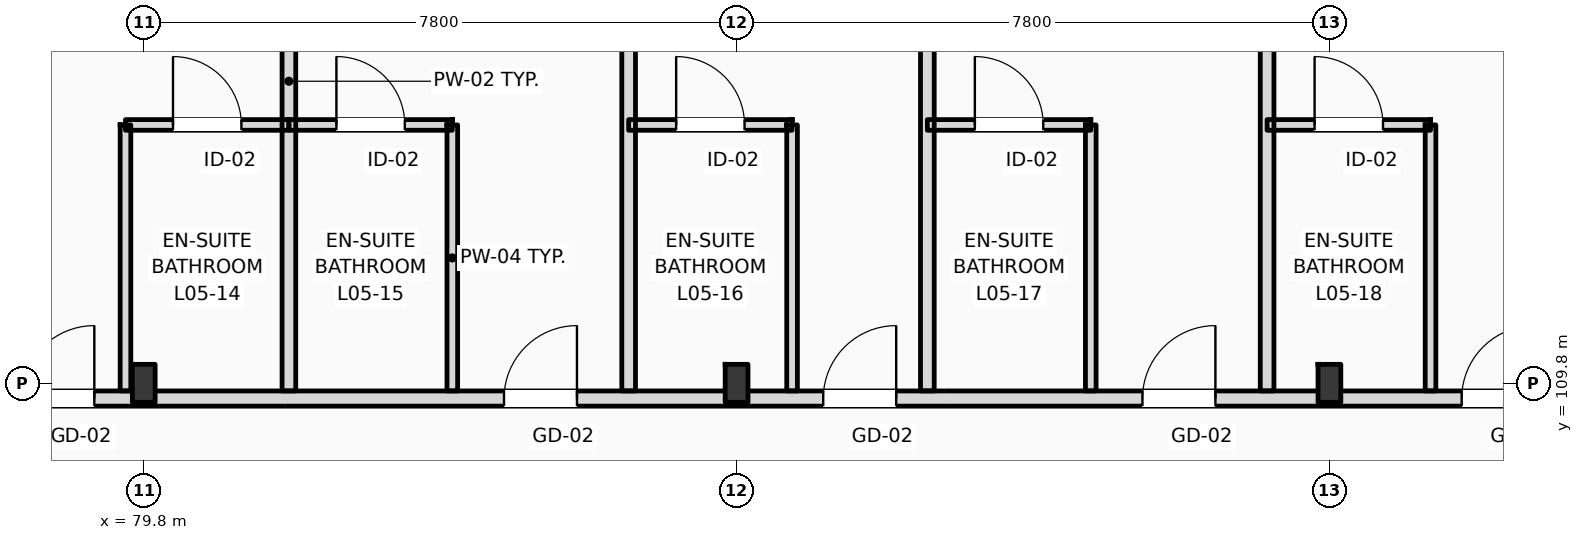
"""IFC4 building model, lengths in metres.
Left out: names, types, materials, properties, quantities, classifications, styles, units other than length and angle.
Written with IfcOpenShell. Run it as: python <this file> out.ifc"""

import sys

from ifc_helpers import new_model, si_unit, direction, frame, frame_2d, origin, origin_2d, place, context, subcontext, project, spatial, rectangle, i_section, extrude, element, fill, save


model = new_model("IFC4")
c1 = context("Model", 3, precision=1e-05, world=origin(), true_north=direction((0.0, 1.0)))
c2 = subcontext(c1, "Body", "Model", "MODEL_VIEW")
j1 = project(units=[si_unit("LENGTHUNIT", "METRE"), si_unit("PLANEANGLEUNIT", "RADIAN")], contexts=[c1])
p1 = place(None, origin())
s1 = spatial("IfcSite", under=j1, at=p1, CompositionType="ELEMENT")
p2 = place(p1, origin())
s2 = spatial("IfcBuilding", under=s1, at=p2, CompositionType="ELEMENT")
p3 = place(p2, frame((0.0, 0.0, 24.6)))
s3 = spatial("IfcBuildingStorey", under=s2, at=p3, CompositionType="ELEMENT", Elevation=24.6)
for number, where, z_axis, x_axis in (
    (1, (79.8, 109.8, 0.0), (0.0, 0.0, 1.0), (1.0, 0.0, 0.0)),
    (2, (87.6, 109.8, 0.0), (0.0, 0.0, 1.0), (1.0, 0.0, 0.0)),
    (3, (95.4, 109.8, 0.0), (0.0, 0.0, 1.0), (1.0, 0.0, 0.0)),
):
    element("IfcColumn", number, at=place(p3, frame(where, z_axis=z_axis, x_axis=x_axis)), inside=s3, PredefinedType="COLUMN", context=c2, shape_type="SweptSolid", body=[
        extrude(i_section(OverallWidth=0.3, OverallDepth=0.5, WebThickness=0.014, FlangeThickness=0.028, FilletRadius=0.027, at=origin_2d()), origin(), (0.0, 0.0, 1.0), 3.6),
    ])
p4 = place(p3, frame((10.65, 109.6, 0.0), z_axis=(0.0, 0.0, 1.0), x_axis=(1.0, 0.0, 0.0)))
e4 = element("IfcWall", 4, at=p4, inside=s3, PredefinedType="PARTITIONING", context=c2, shape_type="SweptSolid", body=[
    extrude(rectangle(XDim=109.21, YDim=0.2, at=frame_2d((54.605, 0.0))), origin(), (0.0, 0.0, 1.0), 2.78),
])
p5 = place(p4, frame((12.705, 0.0, 0.0)))
e5 = element("IfcOpeningElement", 5, at=p5, cuts=e4, PredefinedType="OPENING", context=c2, shape_type="SweptSolid", body=[
    extrude(rectangle(XDim=1.02, YDim=2.2, at=frame_2d((0.51, 1.1))), frame((0.0, 0.11, 0.0), z_axis=(0.0, -1.0, 0.0), x_axis=(1.0, 0.0, 0.0)), (0.0, 0.0, 1.0), 0.22),
])
p6 = place(p4, frame((19.26, 0.0, 0.0)))
e6 = element("IfcOpeningElement", 6, at=p6, cuts=e4, PredefinedType="OPENING", context=c2, shape_type="SweptSolid", body=[
    extrude(rectangle(XDim=1.02, YDim=2.2, at=frame_2d((0.51, 1.1))), frame((0.0, 0.11, 0.0), z_axis=(0.0, -1.0, 0.0), x_axis=(1.0, 0.0, 0.0)), (0.0, 0.0, 1.0), 0.22),
])
p7 = place(p4, frame((23.71, 0.0, 0.0)))
e7 = element("IfcOpeningElement", 7, at=p7, cuts=e4, PredefinedType="OPENING", context=c2, shape_type="SweptSolid", body=[
    extrude(rectangle(XDim=1.02, YDim=2.2, at=frame_2d((0.51, 1.1))), frame((0.0, 0.11, 0.0), z_axis=(0.0, -1.0, 0.0), x_axis=(1.0, 0.0, 0.0)), (0.0, 0.0, 1.0), 0.22),
])
p8 = place(p4, frame((27.66, 0.0, 0.0)))
e8 = element("IfcOpeningElement", 8, at=p8, cuts=e4, PredefinedType="OPENING", context=c2, shape_type="SweptSolid", body=[
    extrude(rectangle(XDim=1.02, YDim=2.2, at=frame_2d((0.51, 1.1))), frame((0.0, 0.11, 0.0), z_axis=(0.0, -1.0, 0.0), x_axis=(1.0, 0.0, 0.0)), (0.0, 0.0, 1.0), 0.22),
])
p9 = place(p4, frame((31.89, 0.0, 0.0)))
e9 = element("IfcOpeningElement", 9, at=p9, cuts=e4, PredefinedType="OPENING", context=c2, shape_type="SweptSolid", body=[
    extrude(rectangle(XDim=0.96, YDim=2.2, at=frame_2d((0.48, 1.1))), frame((0.0, 0.11, 0.0), z_axis=(0.0, -1.0, 0.0), x_axis=(1.0, 0.0, 0.0)), (0.0, 0.0, 1.0), 0.22),
])
p10 = place(p4, frame((33.94, 0.0, 0.0)))
e10 = element("IfcOpeningElement", 10, at=p10, cuts=e4, PredefinedType="OPENING", context=c2, shape_type="SweptSolid", body=[
    extrude(rectangle(XDim=0.96, YDim=2.2, at=frame_2d((0.48, 1.1))), frame((0.0, 0.11, 0.0), z_axis=(0.0, -1.0, 0.0), x_axis=(1.0, 0.0, 0.0)), (0.0, 0.0, 1.0), 0.22),
])
p11 = place(p4, frame((40.29, 0.0, 0.0)))
e11 = element("IfcOpeningElement", 11, at=p11, cuts=e4, PredefinedType="OPENING", context=c2, shape_type="SweptSolid", body=[
    extrude(rectangle(XDim=0.96, YDim=2.2, at=frame_2d((0.48, 1.1))), frame((0.0, 0.11, 0.0), z_axis=(0.0, -1.0, 0.0), x_axis=(1.0, 0.0, 0.0)), (0.0, 0.0, 1.0), 0.22),
])
p12 = place(p4, frame((42.34, 0.0, 0.0)))
e12 = element("IfcOpeningElement", 12, at=p12, cuts=e4, PredefinedType="OPENING", context=c2, shape_type="SweptSolid", body=[
    extrude(rectangle(XDim=0.96, YDim=2.2, at=frame_2d((0.48, 1.1))), frame((0.0, 0.11, 0.0), z_axis=(0.0, -1.0, 0.0), x_axis=(1.0, 0.0, 0.0)), (0.0, 0.0, 1.0), 0.22),
])
p13 = place(p4, frame((48.69, 0.0, 0.0)))
e13 = element("IfcOpeningElement", 13, at=p13, cuts=e4, PredefinedType="OPENING", context=c2, shape_type="SweptSolid", body=[
    extrude(rectangle(XDim=0.96, YDim=2.2, at=frame_2d((0.48, 1.1))), frame((0.0, 0.11, 0.0), z_axis=(0.0, -1.0, 0.0), x_axis=(1.0, 0.0, 0.0)), (0.0, 0.0, 1.0), 0.22),
])
p14 = place(p4, frame((50.74, 0.0, 0.0)))
e14 = element("IfcOpeningElement", 14, at=p14, cuts=e4, PredefinedType="OPENING", context=c2, shape_type="SweptSolid", body=[
    extrude(rectangle(XDim=0.96, YDim=2.2, at=frame_2d((0.48, 1.1))), frame((0.0, 0.11, 0.0), z_axis=(0.0, -1.0, 0.0), x_axis=(1.0, 0.0, 0.0)), (0.0, 0.0, 1.0), 0.22),
])
p15 = place(p4, frame((57.09, 0.0, 0.0)))
e15 = element("IfcOpeningElement", 15, at=p15, cuts=e4, PredefinedType="OPENING", context=c2, shape_type="SweptSolid", body=[
    extrude(rectangle(XDim=0.96, YDim=2.2, at=frame_2d((0.48, 1.1))), frame((0.0, 0.11, 0.0), z_axis=(0.0, -1.0, 0.0), x_axis=(1.0, 0.0, 0.0)), (0.0, 0.0, 1.0), 0.22),
])
p16 = place(p4, frame((59.14, 0.0, 0.0)))
e16 = element("IfcOpeningElement", 16, at=p16, cuts=e4, PredefinedType="OPENING", context=c2, shape_type="SweptSolid", body=[
    extrude(rectangle(XDim=0.96, YDim=2.2, at=frame_2d((0.48, 1.1))), frame((0.0, 0.11, 0.0), z_axis=(0.0, -1.0, 0.0), x_axis=(1.0, 0.0, 0.0)), (0.0, 0.0, 1.0), 0.22),
])
p17 = place(p4, frame((65.49, 0.0, 0.0)))
e17 = element("IfcOpeningElement", 17, at=p17, cuts=e4, PredefinedType="OPENING", context=c2, shape_type="SweptSolid", body=[
    extrude(rectangle(XDim=0.96, YDim=2.2, at=frame_2d((0.48, 1.1))), frame((0.0, 0.11, 0.0), z_axis=(0.0, -1.0, 0.0), x_axis=(1.0, 0.0, 0.0)), (0.0, 0.0, 1.0), 0.22),
])
p18 = place(p4, frame((67.54, 0.0, 0.0)))
e18 = element("IfcOpeningElement", 18, at=p18, cuts=e4, PredefinedType="OPENING", context=c2, shape_type="SweptSolid", body=[
    extrude(rectangle(XDim=0.96, YDim=2.2, at=frame_2d((0.48, 1.1))), frame((0.0, 0.11, 0.0), z_axis=(0.0, -1.0, 0.0), x_axis=(1.0, 0.0, 0.0)), (0.0, 0.0, 1.0), 0.22),
])
p19 = place(p4, frame((73.89, 0.0, 0.0)))
e19 = element("IfcOpeningElement", 19, at=p19, cuts=e4, PredefinedType="OPENING", context=c2, shape_type="SweptSolid", body=[
    extrude(rectangle(XDim=0.96, YDim=2.2, at=frame_2d((0.48, 1.1))), frame((0.0, 0.11, 0.0), z_axis=(0.0, -1.0, 0.0), x_axis=(1.0, 0.0, 0.0)), (0.0, 0.0, 1.0), 0.22),
])
p20 = place(p4, frame((78.09, 0.0, 0.0)))
e20 = element("IfcOpeningElement", 20, at=p20, cuts=e4, PredefinedType="OPENING", context=c2, shape_type="SweptSolid", body=[
    extrude(rectangle(XDim=0.96, YDim=2.2, at=frame_2d((0.48, 1.1))), frame((0.0, 0.11, 0.0), z_axis=(0.0, -1.0, 0.0), x_axis=(1.0, 0.0, 0.0)), (0.0, 0.0, 1.0), 0.22),
])
p21 = place(p4, frame((82.29, 0.0, 0.0)))
e21 = element("IfcOpeningElement", 21, at=p21, cuts=e4, PredefinedType="OPENING", context=c2, shape_type="SweptSolid", body=[
    extrude(rectangle(XDim=0.96, YDim=2.2, at=frame_2d((0.48, 1.1))), frame((0.0, 0.11, 0.0), z_axis=(0.0, -1.0, 0.0), x_axis=(1.0, 0.0, 0.0)), (0.0, 0.0, 1.0), 0.22),
])
p22 = place(p4, frame((86.49, 0.0, 0.0)))
e22 = element("IfcOpeningElement", 22, at=p22, cuts=e4, PredefinedType="OPENING", context=c2, shape_type="SweptSolid", body=[
    extrude(rectangle(XDim=0.96, YDim=2.2, at=frame_2d((0.48, 1.1))), frame((0.0, 0.11, 0.0), z_axis=(0.0, -1.0, 0.0), x_axis=(1.0, 0.0, 0.0)), (0.0, 0.0, 1.0), 0.22),
])
p23 = place(p4, frame((88.54, 0.0, 0.0)))
e23 = element("IfcOpeningElement", 23, at=p23, cuts=e4, PredefinedType="OPENING", context=c2, shape_type="SweptSolid", body=[
    extrude(rectangle(XDim=0.96, YDim=2.2, at=frame_2d((0.48, 1.1))), frame((0.0, 0.11, 0.0), z_axis=(0.0, -1.0, 0.0), x_axis=(1.0, 0.0, 0.0)), (0.0, 0.0, 1.0), 0.22),
])
p24 = place(p4, frame((94.89, 0.0, 0.0)))
e24 = element("IfcOpeningElement", 24, at=p24, cuts=e4, PredefinedType="OPENING", context=c2, shape_type="SweptSolid", body=[
    extrude(rectangle(XDim=0.96, YDim=2.2, at=frame_2d((0.48, 1.1))), frame((0.0, 0.11, 0.0), z_axis=(0.0, -1.0, 0.0), x_axis=(1.0, 0.0, 0.0)), (0.0, 0.0, 1.0), 0.22),
])
p25 = place(p4, frame((96.94, 0.0, 0.0)))
e25 = element("IfcOpeningElement", 25, at=p25, cuts=e4, PredefinedType="OPENING", context=c2, shape_type="SweptSolid", body=[
    extrude(rectangle(XDim=0.96, YDim=2.2, at=frame_2d((0.48, 1.1))), frame((0.0, 0.11, 0.0), z_axis=(0.0, -1.0, 0.0), x_axis=(1.0, 0.0, 0.0)), (0.0, 0.0, 1.0), 0.22),
])
p26 = place(p4, frame((103.29, 0.0, 0.0)))
e26 = element("IfcOpeningElement", 26, at=p26, cuts=e4, PredefinedType="OPENING", context=c2, shape_type="SweptSolid", body=[
    extrude(rectangle(XDim=0.96, YDim=2.2, at=frame_2d((0.48, 1.1))), frame((0.0, 0.11, 0.0), z_axis=(0.0, -1.0, 0.0), x_axis=(1.0, 0.0, 0.0)), (0.0, 0.0, 1.0), 0.22),
])
p27 = place(p4, frame((105.25, 0.0, 0.0)))
e27 = element("IfcOpeningElement", 27, at=p27, cuts=e4, PredefinedType="OPENING", context=c2, shape_type="SweptSolid", body=[
    extrude(rectangle(XDim=0.96, YDim=2.2, at=frame_2d((0.48, 1.1))), frame((0.0, 0.11, 0.0), z_axis=(0.0, -1.0, 0.0), x_axis=(1.0, 0.0, 0.0)), (0.0, 0.0, 1.0), 0.22),
])
p28 = place(p4, frame((2.716, 0.0, 0.0)))
e28 = element("IfcOpeningElement", 28, at=p28, cuts=e4, PredefinedType="OPENING", context=c2, shape_type="SweptSolid", body=[
    extrude(rectangle(XDim=1.35, YDim=2.25, at=frame_2d((0.675, 1.125))), frame((0.0, 0.11, 0.0), z_axis=(0.0, -1.0, 0.0), x_axis=(1.0, 0.0, 0.0)), (0.0, 0.0, 1.0), 0.22),
])
p29 = place(p4, frame((6.65, 0.0, 0.0)))
e29 = element("IfcOpeningElement", 29, at=p29, cuts=e4, PredefinedType="OPENING", context=c2, shape_type="SweptSolid", body=[
    extrude(rectangle(XDim=1.35, YDim=2.25, at=frame_2d((0.675, 1.125))), frame((0.0, 0.11, 0.0), z_axis=(0.0, -1.0, 0.0), x_axis=(1.0, 0.0, 0.0)), (0.0, 0.0, 1.0), 0.22),
])
p30 = place(p4, frame((10.583, 0.0, 0.0)))
e30 = element("IfcOpeningElement", 30, at=p30, cuts=e4, PredefinedType="OPENING", context=c2, shape_type="SweptSolid", body=[
    extrude(rectangle(XDim=1.35, YDim=2.25, at=frame_2d((0.675, 1.125))), frame((0.0, 0.11, 0.0), z_axis=(0.0, -1.0, 0.0), x_axis=(1.0, 0.0, 0.0)), (0.0, 0.0, 1.0), 0.22),
])
p31 = place(p3, frame((81.71, 109.7, 0.0), z_axis=(0.0, 0.0, 1.0), x_axis=(0.0, 1.0, 0.0)))
e31 = element("IfcWall", 31, at=p31, inside=s3, PredefinedType="PARTITIONING", context=c2, shape_type="SweptSolid", body=[
    extrude(rectangle(XDim=8.15, YDim=0.18, at=frame_2d((4.075, 0.0))), origin(), (0.0, 0.0, 1.0), 3.34),
])
p32 = place(p3, frame((79.56, 109.7, 0.0), z_axis=(0.0, 0.0, 1.0), x_axis=(0.0, 1.0, 0.0)))
e32 = element("IfcWall", 32, at=p32, inside=s3, PredefinedType="PARTITIONING", context=c2, shape_type="SweptSolid", body=[
    extrude(rectangle(XDim=3.5, YDim=0.14, at=frame_2d((1.75, 0.0))), origin(), (0.0, 0.0, 1.0), 2.93),
])
p33 = place(p3, frame((79.56, 113.2, 0.0), z_axis=(0.0, 0.0, 1.0), x_axis=(1.0, 0.0, 0.0)))
e33 = element("IfcWall", 33, at=p33, inside=s3, PredefinedType="PARTITIONING", context=c2, shape_type="SweptSolid", body=[
    extrude(rectangle(XDim=2.15, YDim=0.14, at=frame_2d((1.075, 0.0))), origin(), (0.0, 0.0, 1.0), 3.34),
])
p34 = place(p33, frame((0.625, 0.0, 0.0)))
e34 = element("IfcOpeningElement", 34, at=p34, cuts=e33, PredefinedType="OPENING", context=c2, shape_type="SweptSolid", body=[
    extrude(rectangle(XDim=0.9, YDim=2.1, at=frame_2d((0.45, 1.05))), frame((0.0, 0.08, 0.0), z_axis=(0.0, -1.0, 0.0), x_axis=(1.0, 0.0, 0.0)), (0.0, 0.0, 1.0), 0.16),
])
p35 = place(p3, frame((86.18, 109.7, 0.0), z_axis=(0.0, 0.0, 1.0), x_axis=(0.0, 1.0, 0.0)))
e35 = element("IfcWall", 35, at=p35, inside=s3, PredefinedType="PARTITIONING", context=c2, shape_type="SweptSolid", body=[
    extrude(rectangle(XDim=8.15, YDim=0.18, at=frame_2d((4.075, 0.0))), origin(), (0.0, 0.0, 1.0), 3.34),
])
p36 = place(p3, frame((83.86, 109.7, 0.0), z_axis=(0.0, 0.0, 1.0), x_axis=(0.0, 1.0, 0.0)))
e36 = element("IfcWall", 36, at=p36, inside=s3, PredefinedType="PARTITIONING", context=c2, shape_type="SweptSolid", body=[
    extrude(rectangle(XDim=3.5, YDim=0.14, at=frame_2d((1.75, 0.0))), origin(), (0.0, 0.0, 1.0), 3.34),
])
p37 = place(p3, frame((81.71, 113.2, 0.0), z_axis=(0.0, 0.0, 1.0), x_axis=(1.0, 0.0, 0.0)))
e37 = element("IfcWall", 37, at=p37, inside=s3, PredefinedType="PARTITIONING", context=c2, shape_type="SweptSolid", body=[
    extrude(rectangle(XDim=2.15, YDim=0.14, at=frame_2d((1.075, 0.0))), origin(), (0.0, 0.0, 1.0), 3.34),
])
p38 = place(p37, frame((0.625, 0.0, 0.0)))
e38 = element("IfcOpeningElement", 38, at=p38, cuts=e37, PredefinedType="OPENING", context=c2, shape_type="SweptSolid", body=[
    extrude(rectangle(XDim=0.9, YDim=2.1, at=frame_2d((0.45, 1.05))), frame((0.0, 0.08, 0.0), z_axis=(0.0, -1.0, 0.0), x_axis=(1.0, 0.0, 0.0)), (0.0, 0.0, 1.0), 0.16),
])
p39 = place(p3, frame((90.11, 109.7, 0.0), z_axis=(0.0, 0.0, 1.0), x_axis=(0.0, 1.0, 0.0)))
e39 = element("IfcWall", 39, at=p39, inside=s3, PredefinedType="PARTITIONING", context=c2, shape_type="SweptSolid", body=[
    extrude(rectangle(XDim=8.15, YDim=0.18, at=frame_2d((4.075, 0.0))), origin(), (0.0, 0.0, 1.0), 3.03),
])
p40 = place(p3, frame((88.33, 109.7, 0.0), z_axis=(0.0, 0.0, 1.0), x_axis=(0.0, 1.0, 0.0)))
e40 = element("IfcWall", 40, at=p40, inside=s3, PredefinedType="PARTITIONING", context=c2, shape_type="SweptSolid", body=[
    extrude(rectangle(XDim=3.5, YDim=0.14, at=frame_2d((1.75, 0.0))), origin(), (0.0, 0.0, 1.0), 3.34),
])
p41 = place(p3, frame((86.18, 113.2, 0.0), z_axis=(0.0, 0.0, 1.0), x_axis=(1.0, 0.0, 0.0)))
e41 = element("IfcWall", 41, at=p41, inside=s3, PredefinedType="PARTITIONING", context=c2, shape_type="SweptSolid", body=[
    extrude(rectangle(XDim=2.15, YDim=0.14, at=frame_2d((1.075, 0.0))), origin(), (0.0, 0.0, 1.0), 3.34),
])
p42 = place(p41, frame((0.625, 0.0, 0.0)))
e42 = element("IfcOpeningElement", 42, at=p42, cuts=e41, PredefinedType="OPENING", context=c2, shape_type="SweptSolid", body=[
    extrude(rectangle(XDim=0.9, YDim=2.1, at=frame_2d((0.45, 1.05))), frame((0.0, 0.08, 0.0), z_axis=(0.0, -1.0, 0.0), x_axis=(1.0, 0.0, 0.0)), (0.0, 0.0, 1.0), 0.16),
])
p43 = place(p3, frame((94.58, 109.7, 0.0), z_axis=(0.0, 0.0, 1.0), x_axis=(0.0, 1.0, 0.0)))
e43 = element("IfcWall", 43, at=p43, inside=s3, PredefinedType="PARTITIONING", context=c2, shape_type="SweptSolid", body=[
    extrude(rectangle(XDim=8.15, YDim=0.18, at=frame_2d((4.075, 0.0))), origin(), (0.0, 0.0, 1.0), 3.34),
])
p44 = place(p3, frame((92.26, 109.7, 0.0), z_axis=(0.0, 0.0, 1.0), x_axis=(0.0, 1.0, 0.0)))
e44 = element("IfcWall", 44, at=p44, inside=s3, PredefinedType="PARTITIONING", context=c2, shape_type="SweptSolid", body=[
    extrude(rectangle(XDim=3.5, YDim=0.14, at=frame_2d((1.75, 0.0))), origin(), (0.0, 0.0, 1.0), 3.34),
])
p45 = place(p3, frame((90.11, 113.2, 0.0), z_axis=(0.0, 0.0, 1.0), x_axis=(1.0, 0.0, 0.0)))
e45 = element("IfcWall", 45, at=p45, inside=s3, PredefinedType="PARTITIONING", context=c2, shape_type="SweptSolid", body=[
    extrude(rectangle(XDim=2.15, YDim=0.14, at=frame_2d((1.075, 0.0))), origin(), (0.0, 0.0, 1.0), 3.34),
])
p46 = place(p45, frame((0.625, 0.0, 0.0)))
e46 = element("IfcOpeningElement", 46, at=p46, cuts=e45, PredefinedType="OPENING", context=c2, shape_type="SweptSolid", body=[
    extrude(rectangle(XDim=0.9, YDim=2.1, at=frame_2d((0.45, 1.05))), frame((0.0, 0.08, 0.0), z_axis=(0.0, -1.0, 0.0), x_axis=(1.0, 0.0, 0.0)), (0.0, 0.0, 1.0), 0.16),
])
p47 = place(p3, frame((96.73, 109.7, 0.0), z_axis=(0.0, 0.0, 1.0), x_axis=(0.0, 1.0, 0.0)))
e47 = element("IfcWall", 47, at=p47, inside=s3, PredefinedType="PARTITIONING", context=c2, shape_type="SweptSolid", body=[
    extrude(rectangle(XDim=3.5, YDim=0.14, at=frame_2d((1.75, 0.0))), origin(), (0.0, 0.0, 1.0), 3.34),
])
p48 = place(p3, frame((94.58, 113.2, 0.0), z_axis=(0.0, 0.0, 1.0), x_axis=(1.0, 0.0, 0.0)))
e48 = element("IfcWall", 48, at=p48, inside=s3, PredefinedType="PARTITIONING", context=c2, shape_type="SweptSolid", body=[
    extrude(rectangle(XDim=2.15, YDim=0.14, at=frame_2d((1.075, 0.0))), origin(), (0.0, 0.0, 1.0), 3.34),
])
p49 = place(p48, frame((0.625, 0.0, 0.0)))
e49 = element("IfcOpeningElement", 49, at=p49, cuts=e48, PredefinedType="OPENING", context=c2, shape_type="SweptSolid", body=[
    extrude(rectangle(XDim=0.9, YDim=2.1, at=frame_2d((0.45, 1.05))), frame((0.0, 0.08, 0.0), z_axis=(0.0, -1.0, 0.0), x_axis=(1.0, 0.0, 0.0)), (0.0, 0.0, 1.0), 0.16),
])
p50 = place(p18, origin())
e50 = element("IfcDoor", 50, at=p50, inside=s3, OperationType="SINGLE_SWING_RIGHT", PredefinedType="DOOR", context=c2, shape_type="SweptSolid", body=[
    extrude(rectangle(XDim=0.96, YDim=2.2, at=frame_2d((0.48, 1.1))), frame((0.0, 0.025, 0.0), z_axis=(0.0, -1.0, 0.0), x_axis=(1.0, 0.0, 0.0)), (0.0, 0.0, 1.0), 0.05),
])
fill(e18, e50)
p51 = place(p34, origin())
e51 = element("IfcDoor", 51, at=p51, inside=s3, OperationType="SINGLE_SWING_LEFT", PredefinedType="DOOR", context=c2, shape_type="SweptSolid", body=[
    extrude(rectangle(XDim=0.9, YDim=2.1, at=frame_2d((0.45, 1.05))), frame((0.0, 0.025, 0.0), z_axis=(0.0, -1.0, 0.0), x_axis=(1.0, 0.0, 0.0)), (0.0, 0.0, 1.0), 0.05),
])
fill(e34, e51)
p52 = place(p19, origin())
e52 = element("IfcDoor", 52, at=p52, inside=s3, OperationType="SINGLE_SWING_RIGHT", PredefinedType="DOOR", context=c2, shape_type="SweptSolid", body=[
    extrude(rectangle(XDim=0.96, YDim=2.2, at=frame_2d((0.48, 1.1))), frame((0.0, 0.025, 0.0), z_axis=(0.0, -1.0, 0.0), x_axis=(1.0, 0.0, 0.0)), (0.0, 0.0, 1.0), 0.05),
])
fill(e19, e52)
p53 = place(p38, origin())
e53 = element("IfcDoor", 53, at=p53, inside=s3, OperationType="SINGLE_SWING_LEFT", PredefinedType="DOOR", context=c2, shape_type="SweptSolid", body=[
    extrude(rectangle(XDim=0.9, YDim=2.1, at=frame_2d((0.45, 1.05))), frame((0.0, 0.025, 0.0), z_axis=(0.0, -1.0, 0.0), x_axis=(1.0, 0.0, 0.0)), (0.0, 0.0, 1.0), 0.05),
])
fill(e38, e53)
p54 = place(p20, origin())
e54 = element("IfcDoor", 54, at=p54, inside=s3, OperationType="SINGLE_SWING_RIGHT", PredefinedType="DOOR", context=c2, shape_type="SweptSolid", body=[
    extrude(rectangle(XDim=0.96, YDim=2.2, at=frame_2d((0.48, 1.1))), frame((0.0, 0.025, 0.0), z_axis=(0.0, -1.0, 0.0), x_axis=(1.0, 0.0, 0.0)), (0.0, 0.0, 1.0), 0.05),
])
fill(e20, e54)
p55 = place(p42, origin())
e55 = element("IfcDoor", 55, at=p55, inside=s3, OperationType="SINGLE_SWING_LEFT", PredefinedType="DOOR", context=c2, shape_type="SweptSolid", body=[
    extrude(rectangle(XDim=0.9, YDim=2.1, at=frame_2d((0.45, 1.05))), frame((0.0, 0.025, 0.0), z_axis=(0.0, -1.0, 0.0), x_axis=(1.0, 0.0, 0.0)), (0.0, 0.0, 1.0), 0.05),
])
fill(e42, e55)
p56 = place(p21, origin())
e56 = element("IfcDoor", 56, at=p56, inside=s3, OperationType="SINGLE_SWING_RIGHT", PredefinedType="DOOR", context=c2, shape_type="SweptSolid", body=[
    extrude(rectangle(XDim=0.96, YDim=2.2, at=frame_2d((0.48, 1.1))), frame((0.0, 0.025, 0.0), z_axis=(0.0, -1.0, 0.0), x_axis=(1.0, 0.0, 0.0)), (0.0, 0.0, 1.0), 0.05),
])
fill(e21, e56)
p57 = place(p46, origin())
e57 = element("IfcDoor", 57, at=p57, inside=s3, OperationType="SINGLE_SWING_LEFT", PredefinedType="DOOR", context=c2, shape_type="SweptSolid", body=[
    extrude(rectangle(XDim=0.9, YDim=2.1, at=frame_2d((0.45, 1.05))), frame((0.0, 0.025, 0.0), z_axis=(0.0, -1.0, 0.0), x_axis=(1.0, 0.0, 0.0)), (0.0, 0.0, 1.0), 0.05),
])
fill(e46, e57)
p58 = place(p22, origin())
e58 = element("IfcDoor", 58, at=p58, inside=s3, OperationType="SINGLE_SWING_RIGHT", PredefinedType="DOOR", context=c2, shape_type="SweptSolid", body=[
    extrude(rectangle(XDim=0.96, YDim=2.2, at=frame_2d((0.48, 1.1))), frame((0.0, 0.025, 0.0), z_axis=(0.0, -1.0, 0.0), x_axis=(1.0, 0.0, 0.0)), (0.0, 0.0, 1.0), 0.05),
])
fill(e22, e58)
p59 = place(p49, origin())
e59 = element("IfcDoor", 59, at=p59, inside=s3, OperationType="SINGLE_SWING_LEFT", PredefinedType="DOOR", context=c2, shape_type="SweptSolid", body=[
    extrude(rectangle(XDim=0.9, YDim=2.1, at=frame_2d((0.45, 1.05))), frame((0.0, 0.025, 0.0), z_axis=(0.0, -1.0, 0.0), x_axis=(1.0, 0.0, 0.0)), (0.0, 0.0, 1.0), 0.05),
])
fill(e49, e59)
save(model, sys.argv[1])
